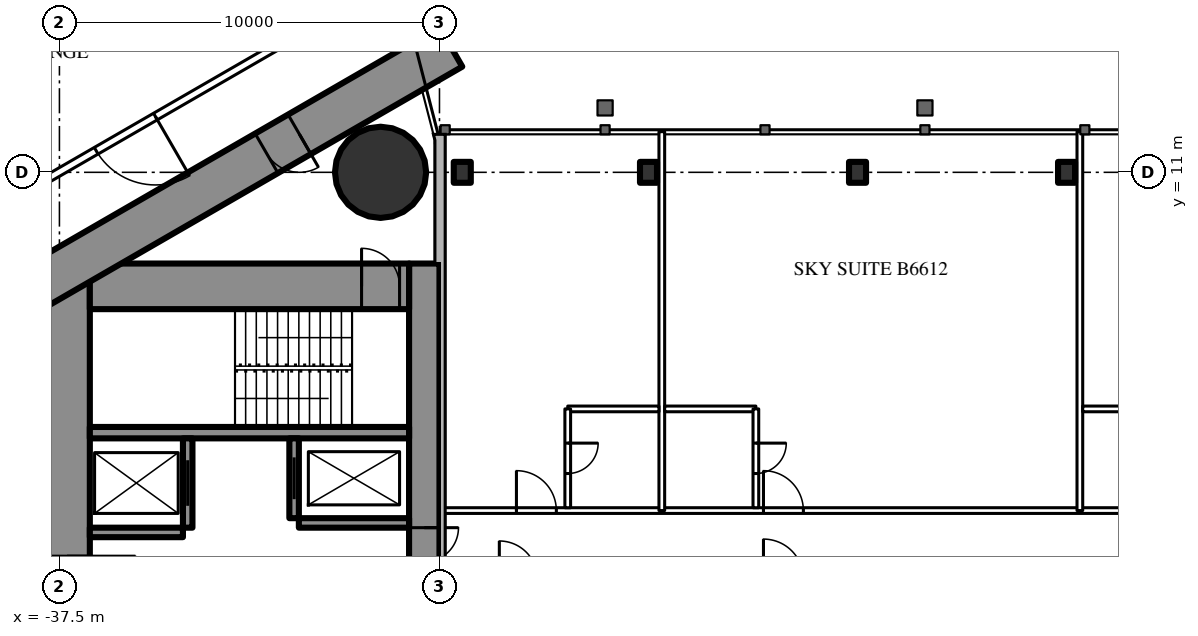
"""IFC4 building model, lengths in metres.
Left out: names, types, materials, properties, quantities, classifications, styles, units other than length and angle.
Written with IfcOpenShell. Run it as: python <this file> out.ifc"""

import sys

from ifc_helpers import new_model, si_unit, direction, frame, frame_2d, origin, origin_2d, place, context, subcontext, project, spatial, rectangle, circle, i_section, extrude, element, fill, save


model = new_model("IFC4")
c1 = context("Model", 3, precision=1e-05, world=origin(), true_north=direction((0.0, 1.0)))
c2 = subcontext(c1, "Body", "Model", "MODEL_VIEW")
j1 = project(units=[si_unit("LENGTHUNIT", "METRE"), si_unit("PLANEANGLEUNIT", "RADIAN")], contexts=[c1])
p1 = place(None, origin())
s1 = spatial("IfcSite", under=j1, at=p1, CompositionType="ELEMENT")
p2 = place(p1, origin())
s2 = spatial("IfcBuilding", under=s1, at=p2, CompositionType="ELEMENT")
p3 = place(p2, frame((0.0, 0.0, 247.7)))
s3 = spatial("IfcBuildingStorey", under=s2, at=p3, CompositionType="ELEMENT", Elevation=247.7)
p4 = place(p3, frame((-29.05, 11.0, 0.0), z_axis=(0.0, 0.0, 1.0), x_axis=(1.0, 0.0, 0.0)))
e1 = element("IfcColumn", 1, at=p4, inside=s3, PredefinedType="COLUMN", context=c2, shape_type="SweptSolid", body=[
    extrude(circle(Radius=1.2, at=origin_2d()), origin(), (0.0, 0.0, 1.0), 4.2),
])
p5 = place(p3, frame((-27.9, 8.6, 0.0), z_axis=(0.0, 0.0, 1.0), x_axis=(0.0, -1.0, 0.0)))
e2 = element("IfcWall", 2, at=p5, inside=s3, PredefinedType="SHEAR", context=c2, shape_type="SweptSolid", body=[
    extrude(rectangle(XDim=17.2, YDim=0.8, at=frame_2d((8.6, 0.0))), origin(), (0.0, 0.0, 1.0), 4.2),
])
p6 = place(p5, frame((6.95, 0.0, 0.0)))
e3 = element("IfcOpeningElement", 3, at=p6, cuts=e2, PredefinedType="OPENING", context=c2, shape_type="SweptSolid", body=[
    extrude(rectangle(XDim=0.9, YDim=2.2, at=frame_2d((0.45, 1.1))), frame((0.0, 0.41, 0.0), z_axis=(0.0, -1.0, 0.0), x_axis=(1.0, 0.0, 0.0)), (0.0, 0.0, 1.0), 0.82),
])
p7 = place(p3, frame((-37.3, 8.6, 0.0), z_axis=(0.0, 0.0, 1.0), x_axis=(0.0, -1.0, 0.0)))
e4 = element("IfcWall", 4, at=p7, inside=s3, PredefinedType="SHEAR", context=c2, shape_type="SweptSolid", body=[
    extrude(rectangle(XDim=17.2, YDim=1.2, at=frame_2d((8.6, 0.0))), origin(), (0.0, 0.0, 1.0), 4.2),
])
p8 = place(p7, frame((7.7, 0.0, 0.0)))
e5 = element("IfcOpeningElement", 5, at=p8, cuts=e4, PredefinedType="OPENING", context=c2, shape_type="SweptSolid", body=[
    extrude(rectangle(XDim=1.8, YDim=2.2, at=frame_2d((0.9, 1.1))), frame((0.0, 0.61, 0.0), z_axis=(0.0, -1.0, 0.0), x_axis=(1.0, 0.0, 0.0)), (0.0, 0.0, 1.0), 1.22),
])
p9 = place(p3, frame((-28.3, 8.0, 0.0), z_axis=(0.0, 0.0, 1.0), x_axis=(-1.0, 0.0, 0.0)))
e6 = element("IfcWall", 6, at=p9, inside=s3, PredefinedType="SHEAR", context=c2, shape_type="SweptSolid", body=[
    extrude(rectangle(XDim=8.4, YDim=1.2, at=frame_2d((4.2, 0.0))), origin(), (0.0, 0.0, 1.0), 4.2),
])
p10 = place(p9, frame((0.25, 0.0, 0.0)))
e7 = element("IfcOpeningElement", 7, at=p10, cuts=e6, PredefinedType="OPENING", context=c2, shape_type="SweptSolid", body=[
    extrude(rectangle(XDim=1.0, YDim=2.2, at=frame_2d((0.5, 1.1))), frame((0.0, 0.61, 0.0), z_axis=(0.0, -1.0, 0.0), x_axis=(1.0, 0.0, 0.0)), (0.0, 0.0, 1.0), 1.22),
])
p11 = place(p3, frame((-28.3, 4.15, 0.0), z_axis=(0.0, 0.0, 1.0), x_axis=(-1.0, 0.0, 0.0)))
e8 = element("IfcWall", 8, at=p11, inside=s3, PredefinedType="SHEAR", context=c2, shape_type="SweptSolid", body=[
    extrude(rectangle(XDim=8.4, YDim=0.3, at=frame_2d((4.2, 0.0))), origin(), (0.0, 0.0, 1.0), 4.2),
])
p12 = place(p3, frame((-31.325, 4.0, 0.0), z_axis=(0.0, 0.0, 1.0), x_axis=(0.0, -1.0, 0.0)))
e9 = element("IfcWall", 9, at=p12, inside=s3, PredefinedType="SHEAR", context=c2, shape_type="SweptSolid", body=[
    extrude(rectangle(XDim=2.1, YDim=0.25, at=frame_2d((1.05, 0.0))), origin(), (0.0, 0.0, 1.0), 4.2),
])
p13 = place(p12, frame((0.5, 0.0, 0.0)))
e10 = element("IfcOpeningElement", 10, at=p13, cuts=e9, PredefinedType="OPENING", context=c2, shape_type="SweptSolid", body=[
    extrude(rectangle(XDim=1.1, YDim=2.2, at=frame_2d((0.55, 1.1))), frame((0.0, 0.135, 0.0), z_axis=(0.0, -1.0, 0.0), x_axis=(1.0, 0.0, 0.0)), (0.0, 0.0, 1.0), 0.27),
])
p14 = place(p3, frame((-34.125, 4.0, 0.0), z_axis=(0.0, 0.0, 1.0), x_axis=(0.0, -1.0, 0.0)))
e11 = element("IfcWall", 11, at=p14, inside=s3, PredefinedType="SHEAR", context=c2, shape_type="SweptSolid", body=[
    extrude(rectangle(XDim=2.35, YDim=0.25, at=frame_2d((1.175, 0.0))), origin(), (0.0, 0.0, 1.0), 4.2),
])
p15 = place(p14, frame((0.575, 0.0, 0.0)))
e12 = element("IfcOpeningElement", 12, at=p15, cuts=e11, PredefinedType="OPENING", context=c2, shape_type="SweptSolid", body=[
    extrude(rectangle(XDim=1.2, YDim=2.2, at=frame_2d((0.6, 1.1))), frame((0.0, 0.135, 0.0), z_axis=(0.0, -1.0, 0.0), x_axis=(1.0, 0.0, 0.0)), (0.0, 0.0, 1.0), 0.27),
])
p16 = place(p3, frame((-28.3, 1.775, 0.0), z_axis=(0.0, 0.0, 1.0), x_axis=(-1.0, 0.0, 0.0)))
e13 = element("IfcWall", 13, at=p16, inside=s3, PredefinedType="SHEAR", context=c2, shape_type="SweptSolid", body=[
    extrude(rectangle(XDim=2.9, YDim=0.25, at=frame_2d((1.45, 0.0))), origin(), (0.0, 0.0, 1.0), 4.2),
])
p17 = place(p3, frame((-34.25, 1.525, 0.0), z_axis=(0.0, 0.0, 1.0), x_axis=(-1.0, 0.0, 0.0)))
e14 = element("IfcWall", 14, at=p17, inside=s3, PredefinedType="SHEAR", context=c2, shape_type="SweptSolid", body=[
    extrude(rectangle(XDim=2.45, YDim=0.25, at=frame_2d((1.225, 0.0))), origin(), (0.0, 0.0, 1.0), 4.2),
])
p18 = place(p3, frame((-27.2, 14.3, 0.0), z_axis=(0.0, 0.0, 1.0), x_axis=(-0.866026593062, -0.499997940104, 0.0)))
e15 = element("IfcWall", 15, at=p18, inside=s3, PredefinedType="SHEAR", context=c2, shape_type="SweptSolid", body=[
    extrude(rectangle(XDim=28.946, YDim=1.2, at=frame_2d((14.473, 0.0))), origin(), (0.0, 0.0, 1.0), 4.2),
])
p19 = place(p18, frame((4.6, 0.0, 0.0)))
e16 = element("IfcOpeningElement", 16, at=p19, cuts=e15, PredefinedType="OPENING", context=c2, shape_type="SweptSolid", body=[
    extrude(rectangle(XDim=1.0, YDim=2.2, at=frame_2d((0.5, 1.1))), frame((0.0, 0.61, 0.0), z_axis=(0.0, -1.0, 0.0), x_axis=(1.0, 0.0, 0.0)), (0.0, 0.0, 1.0), 1.22),
])
p20 = place(p18, frame((13.395, 0.0, 0.0)))
e17 = element("IfcOpeningElement", 17, at=p20, cuts=e15, PredefinedType="OPENING", context=c2, shape_type="SweptSolid", body=[
    extrude(rectangle(XDim=1.8, YDim=2.2, at=frame_2d((0.9, 1.1))), frame((0.0, 0.61, 0.0), z_axis=(0.0, -1.0, 0.0), x_axis=(1.0, 0.0, 0.0)), (0.0, 0.0, 1.0), 1.22),
])
for number, where, z_axis, x_axis in (
    (18, (-26.9, 11.0, 0.0), (0.0, 0.0, 1.0), (1.0, 0.0, 0.0)),
    (19, (-22.0, 11.0, 0.0), (0.0, 0.0, 1.0), (1.0, 0.0, 0.0)),
    (20, (-16.5, 11.0, 0.0), (0.0, 0.0, 1.0), (1.0, 0.0, 0.0)),
    (21, (-11.0, 11.0, 0.0), (0.0, 0.0, 1.0), (1.0, 0.0, 0.0)),
):
    element("IfcColumn", number, at=place(p3, frame(where, z_axis=z_axis, x_axis=x_axis)), inside=s3, PredefinedType="COLUMN", context=c2, shape_type="SweptSolid", body=[
        extrude(i_section(OverallWidth=0.448, OverallDepth=0.55, WebThickness=0.072, FlangeThickness=0.115, FilletRadius=0.02, at=origin_2d()), origin(), (0.0, 0.0, 1.0), 4.2),
    ])
p21 = place(p3, frame((-28.681, 16.101, 0.0), z_axis=(0.0, 0.0, 1.0), x_axis=(-0.866024860443, -0.500000941094, 0.0)))
e22 = element("IfcWall", 22, at=p21, inside=s3, PredefinedType="PARTITIONING", context=c2, shape_type="SweptSolid", body=[
    extrude(rectangle(XDim=32.201, YDim=0.2, at=frame_2d((16.101, 0.0))), origin(), (0.0, 0.0, 1.0), 3.95),
])
p22 = place(p21, frame((7.266, 0.0, 0.0)))
e23 = element("IfcOpeningElement", 23, at=p22, cuts=e22, PredefinedType="OPENING", context=c2, shape_type="SweptSolid", body=[
    extrude(rectangle(XDim=1.8, YDim=2.2, at=frame_2d((0.9, 1.1))), frame((0.0, 0.11, 0.0), z_axis=(0.0, -1.0, 0.0), x_axis=(1.0, 0.0, 0.0)), (0.0, 0.0, 1.0), 0.22),
])
p23 = place(p21, frame((17.281, 0.0, 0.0)))
e24 = element("IfcOpeningElement", 24, at=p23, cuts=e22, PredefinedType="OPENING", context=c2, shape_type="SweptSolid", body=[
    extrude(rectangle(XDim=1.8, YDim=2.2, at=frame_2d((0.9, 1.1))), frame((0.0, 0.11, 0.0), z_axis=(0.0, -1.0, 0.0), x_axis=(1.0, 0.0, 0.0)), (0.0, 0.0, 1.0), 0.22),
])
p24 = place(p21, frame((21.43, 0.0, 0.0)))
e25 = element("IfcOpeningElement", 25, at=p24, cuts=e22, PredefinedType="OPENING", context=c2, shape_type="SweptSolid", body=[
    extrude(rectangle(XDim=1.8, YDim=2.2, at=frame_2d((0.9, 1.1))), frame((0.0, 0.11, 0.0), z_axis=(0.0, -1.0, 0.0), x_axis=(1.0, 0.0, 0.0)), (0.0, 0.0, 1.0), 0.22),
])
p25 = place(p21, frame((27.29, 0.0, 0.0)))
e26 = element("IfcOpeningElement", 26, at=p25, cuts=e22, PredefinedType="OPENING", context=c2, shape_type="SweptSolid", body=[
    extrude(rectangle(XDim=1.8, YDim=2.2, at=frame_2d((0.9, 1.1))), frame((0.0, 0.11, 0.0), z_axis=(0.0, -1.0, 0.0), x_axis=(1.0, 0.0, 0.0)), (0.0, 0.0, 1.0), 0.22),
])
p26 = place(p3, frame((-27.5, 2.1, 0.0), z_axis=(0.0, 0.0, 1.0), x_axis=(1.0, 0.0, 0.0)))
e27 = element("IfcWall", 27, at=p26, inside=s3, PredefinedType="PARTITIONING", context=c2, shape_type="SweptSolid", body=[
    extrude(rectangle(XDim=55.0, YDim=0.15, at=frame_2d((27.5, 0.0))), origin(), (0.0, 0.0, 1.0), 4.0),
])
p27 = place(p26, frame((2.025, 0.0, 0.0)))
e28 = element("IfcOpeningElement", 28, at=p27, cuts=e27, PredefinedType="OPENING", context=c2, shape_type="SweptSolid", body=[
    extrude(rectangle(XDim=1.05, YDim=2.4, at=frame_2d((0.525, 1.2))), frame((0.0, 0.085, 0.0), z_axis=(0.0, -1.0, 0.0), x_axis=(1.0, 0.0, 0.0)), (0.0, 0.0, 1.0), 0.17),
])
p28 = place(p26, frame((8.525, 0.0, 0.0)))
e29 = element("IfcOpeningElement", 29, at=p28, cuts=e27, PredefinedType="OPENING", context=c2, shape_type="SweptSolid", body=[
    extrude(rectangle(XDim=1.05, YDim=2.4, at=frame_2d((0.525, 1.2))), frame((0.0, 0.085, 0.0), z_axis=(0.0, -1.0, 0.0), x_axis=(1.0, 0.0, 0.0)), (0.0, 0.0, 1.0), 0.17),
])
p29 = place(p26, frame((19.525, 0.0, 0.0)))
e30 = element("IfcOpeningElement", 30, at=p29, cuts=e27, PredefinedType="OPENING", context=c2, shape_type="SweptSolid", body=[
    extrude(rectangle(XDim=1.05, YDim=2.4, at=frame_2d((0.525, 1.2))), frame((0.0, 0.085, 0.0), z_axis=(0.0, -1.0, 0.0), x_axis=(1.0, 0.0, 0.0)), (0.0, 0.0, 1.0), 0.17),
])
p30 = place(p26, frame((30.525, 0.0, 0.0)))
e31 = element("IfcOpeningElement", 31, at=p30, cuts=e27, PredefinedType="OPENING", context=c2, shape_type="SweptSolid", body=[
    extrude(rectangle(XDim=1.05, YDim=2.4, at=frame_2d((0.525, 1.2))), frame((0.0, 0.085, 0.0), z_axis=(0.0, -1.0, 0.0), x_axis=(1.0, 0.0, 0.0)), (0.0, 0.0, 1.0), 0.17),
])
p31 = place(p26, frame((41.525, 0.0, 0.0)))
e32 = element("IfcOpeningElement", 32, at=p31, cuts=e27, PredefinedType="OPENING", context=c2, shape_type="SweptSolid", body=[
    extrude(rectangle(XDim=1.05, YDim=2.4, at=frame_2d((0.525, 1.2))), frame((0.0, 0.085, 0.0), z_axis=(0.0, -1.0, 0.0), x_axis=(1.0, 0.0, 0.0)), (0.0, 0.0, 1.0), 0.17),
])
p32 = place(p26, frame((52.525, 0.0, 0.0)))
e33 = element("IfcOpeningElement", 33, at=p32, cuts=e27, PredefinedType="OPENING", context=c2, shape_type="SweptSolid", body=[
    extrude(rectangle(XDim=1.05, YDim=2.4, at=frame_2d((0.525, 1.2))), frame((0.0, 0.085, 0.0), z_axis=(0.0, -1.0, 0.0), x_axis=(1.0, 0.0, 0.0)), (0.0, 0.0, 1.0), 0.17),
])
for number, where, z_axis, x_axis in (
    (34, (-21.65, 2.1, 0.0), (0.0, 0.0, 1.0), (0.0, 1.0, 0.0)),
    (35, (-10.65, 2.1, 0.0), (0.0, 0.0, 1.0), (0.0, 1.0, 0.0)),
):
    element("IfcWall", number, at=place(p3, frame(where, z_axis=z_axis, x_axis=x_axis)), inside=s3, PredefinedType="PARTITIONING", context=c2, shape_type="SweptSolid", body=[
        extrude(rectangle(XDim=9.97, YDim=0.15, at=frame_2d((4.985, 0.0))), origin(), (0.0, 0.0, 1.0), 4.0),
    ])
p33 = place(p3, frame((-24.125, 4.775, 0.0), z_axis=(0.0, 0.0, 1.0), x_axis=(1.0, 0.0, 0.0)))
e36 = element("IfcWall", 36, at=p33, inside=s3, PredefinedType="PARTITIONING", context=c2, shape_type="SweptSolid", body=[
    extrude(rectangle(XDim=2.4, YDim=0.15, at=frame_2d((1.2, 0.0))), origin(), (0.0, 0.0, 1.0), 4.0),
])
p34 = place(p3, frame((-24.125, 2.175, 0.0), z_axis=(0.0, 0.0, 1.0), x_axis=(0.0, 1.0, 0.0)))
e37 = element("IfcWall", 37, at=p34, inside=s3, PredefinedType="PARTITIONING", context=c2, shape_type="SweptSolid", body=[
    extrude(rectangle(XDim=2.6, YDim=0.15, at=frame_2d((1.3, 0.0))), origin(), (0.0, 0.0, 1.0), 4.0),
])
p35 = place(p34, frame((0.9, 0.0, 0.0)))
e38 = element("IfcOpeningElement", 38, at=p35, cuts=e37, PredefinedType="OPENING", context=c2, shape_type="SweptSolid", body=[
    extrude(rectangle(XDim=0.8, YDim=2.2, at=frame_2d((0.4, 1.1))), frame((0.0, 0.085, 0.0), z_axis=(0.0, -1.0, 0.0), x_axis=(1.0, 0.0, 0.0)), (0.0, 0.0, 1.0), 0.17),
])
p36 = place(p3, frame((-21.575, 4.775, 0.0), z_axis=(0.0, 0.0, 1.0), x_axis=(1.0, 0.0, 0.0)))
e39 = element("IfcWall", 39, at=p36, inside=s3, PredefinedType="PARTITIONING", context=c2, shape_type="SweptSolid", body=[
    extrude(rectangle(XDim=2.4, YDim=0.15, at=frame_2d((1.2, 0.0))), origin(), (0.0, 0.0, 1.0), 4.0),
])
p37 = place(p3, frame((-19.175, 2.175, 0.0), z_axis=(0.0, 0.0, 1.0), x_axis=(0.0, 1.0, 0.0)))
e40 = element("IfcWall", 40, at=p37, inside=s3, PredefinedType="PARTITIONING", context=c2, shape_type="SweptSolid", body=[
    extrude(rectangle(XDim=2.6, YDim=0.15, at=frame_2d((1.3, 0.0))), origin(), (0.0, 0.0, 1.0), 4.0),
])
p38 = place(p37, frame((0.9, 0.0, 0.0)))
e41 = element("IfcOpeningElement", 41, at=p38, cuts=e40, PredefinedType="OPENING", context=c2, shape_type="SweptSolid", body=[
    extrude(rectangle(XDim=0.8, YDim=2.2, at=frame_2d((0.4, 1.1))), frame((0.0, 0.085, 0.0), z_axis=(0.0, -1.0, 0.0), x_axis=(1.0, 0.0, 0.0)), (0.0, 0.0, 1.0), 0.17),
])
p39 = place(p3, frame((-10.575, 4.775, 0.0), z_axis=(0.0, 0.0, 1.0), x_axis=(1.0, 0.0, 0.0)))
e42 = element("IfcWall", 42, at=p39, inside=s3, PredefinedType="PARTITIONING", context=c2, shape_type="SweptSolid", body=[
    extrude(rectangle(XDim=2.4, YDim=0.15, at=frame_2d((1.2, 0.0))), origin(), (0.0, 0.0, 1.0), 4.0),
])
p40 = place(p22, origin())
e43 = element("IfcDoor", 43, at=p40, inside=s3, OperationType="DOUBLE_DOOR_SINGLE_SWING", PredefinedType="DOOR", context=c2, shape_type="SweptSolid", body=[
    extrude(rectangle(XDim=1.8, YDim=2.2, at=frame_2d((0.9, 1.1))), frame((0.0, 0.025, 0.0), z_axis=(0.0, -1.0, 0.0), x_axis=(1.0, 0.0, 0.0)), (0.0, 0.0, 1.0), 0.05),
])
fill(e23, e43)
p41 = place(p19, origin())
e44 = element("IfcDoor", 44, at=p41, inside=s3, OperationType="SINGLE_SWING_LEFT", PredefinedType="DOOR", context=c2, shape_type="SweptSolid", body=[
    extrude(rectangle(XDim=1.0, YDim=2.2, at=frame_2d((0.5, 1.1))), frame((0.0, 0.025, 0.0), z_axis=(0.0, -1.0, 0.0), x_axis=(1.0, 0.0, 0.0)), (0.0, 0.0, 1.0), 0.05),
])
fill(e16, e44)
p42 = place(p8, origin())
e45 = element("IfcDoor", 45, at=p42, inside=s3, OperationType="DOUBLE_DOOR_SINGLE_SWING", PredefinedType="DOOR", context=c2, shape_type="SweptSolid", body=[
    extrude(rectangle(XDim=1.8, YDim=2.2, at=frame_2d((0.9, 1.1))), frame((0.0, 0.025, 0.0), z_axis=(0.0, -1.0, 0.0), x_axis=(1.0, 0.0, 0.0)), (0.0, 0.0, 1.0), 0.05),
])
fill(e5, e45)
p43 = place(p10, origin())
e46 = element("IfcDoor", 46, at=p43, inside=s3, OperationType="SINGLE_SWING_RIGHT", PredefinedType="DOOR", context=c2, shape_type="SweptSolid", body=[
    extrude(rectangle(XDim=1.0, YDim=2.2, at=frame_2d((0.5, 1.1))), frame((0.0, 0.025, 0.0), z_axis=(0.0, -1.0, 0.0), x_axis=(1.0, 0.0, 0.0)), (0.0, 0.0, 1.0), 0.05),
])
fill(e7, e46)
p44 = place(p6, origin())
e47 = element("IfcDoor", 47, at=p44, inside=s3, OperationType="SINGLE_SWING_LEFT", PredefinedType="DOOR", context=c2, shape_type="SweptSolid", body=[
    extrude(rectangle(XDim=0.9, YDim=2.2, at=frame_2d((0.45, 1.1))), frame((0.0, 0.025, 0.0), z_axis=(0.0, -1.0, 0.0), x_axis=(1.0, 0.0, 0.0)), (0.0, 0.0, 1.0), 0.05),
])
fill(e3, e47)
p45 = place(p35, origin())
e48 = element("IfcDoor", 48, at=p45, inside=s3, OperationType="SINGLE_SWING_RIGHT", PredefinedType="DOOR", context=c2, shape_type="SweptSolid", body=[
    extrude(rectangle(XDim=0.8, YDim=2.2, at=frame_2d((0.4, 1.1))), frame((0.0, 0.025, 0.0), z_axis=(0.0, -1.0, 0.0), x_axis=(1.0, 0.0, 0.0)), (0.0, 0.0, 1.0), 0.05),
])
fill(e38, e48)
p46 = place(p27, origin())
e49 = element("IfcDoor", 49, at=p46, inside=s3, OperationType="SINGLE_SWING_LEFT", PredefinedType="DOOR", context=c2, shape_type="SweptSolid", body=[
    extrude(rectangle(XDim=1.05, YDim=2.4, at=frame_2d((0.525, 1.2))), frame((0.0, 0.025, 0.0), z_axis=(0.0, -1.0, 0.0), x_axis=(1.0, 0.0, 0.0)), (0.0, 0.0, 1.0), 0.05),
])
fill(e28, e49)
p47 = place(p38, origin())
e50 = element("IfcDoor", 50, at=p47, inside=s3, OperationType="SINGLE_SWING_RIGHT", PredefinedType="DOOR", context=c2, shape_type="SweptSolid", body=[
    extrude(rectangle(XDim=0.8, YDim=2.2, at=frame_2d((0.4, 1.1))), frame((0.0, 0.025, 0.0), z_axis=(0.0, -1.0, 0.0), x_axis=(1.0, 0.0, 0.0)), (0.0, 0.0, 1.0), 0.05),
])
fill(e41, e50)
p48 = place(p28, origin())
e51 = element("IfcDoor", 51, at=p48, inside=s3, OperationType="SINGLE_SWING_LEFT", PredefinedType="DOOR", context=c2, shape_type="SweptSolid", body=[
    extrude(rectangle(XDim=1.05, YDim=2.4, at=frame_2d((0.525, 1.2))), frame((0.0, 0.025, 0.0), z_axis=(0.0, -1.0, 0.0), x_axis=(1.0, 0.0, 0.0)), (0.0, 0.0, 1.0), 0.05),
])
fill(e29, e51)
p49 = place(p13, origin())
e52 = element("IfcDoor", 52, at=p49, inside=s3, OperationType="SLIDING_TO_LEFT", PredefinedType="USERDEFINED", context=c2, shape_type="SweptSolid", body=[
    extrude(rectangle(XDim=1.1, YDim=2.2, at=frame_2d((0.55, 1.1))), frame((0.0, 0.025, 0.0), z_axis=(0.0, -1.0, 0.0), x_axis=(1.0, 0.0, 0.0)), (0.0, 0.0, 1.0), 0.05),
])
fill(e10, e52)
p50 = place(p15, origin())
e53 = element("IfcDoor", 53, at=p50, inside=s3, OperationType="DOUBLE_DOOR_SLIDING", PredefinedType="USERDEFINED", context=c2, shape_type="SweptSolid", body=[
    extrude(rectangle(XDim=1.2, YDim=2.2, at=frame_2d((0.6, 1.1))), frame((0.0, 0.025, 0.0), z_axis=(0.0, -1.0, 0.0), x_axis=(1.0, 0.0, 0.0)), (0.0, 0.0, 1.0), 0.05),
])
fill(e12, e53)
save(model, sys.argv[1])
